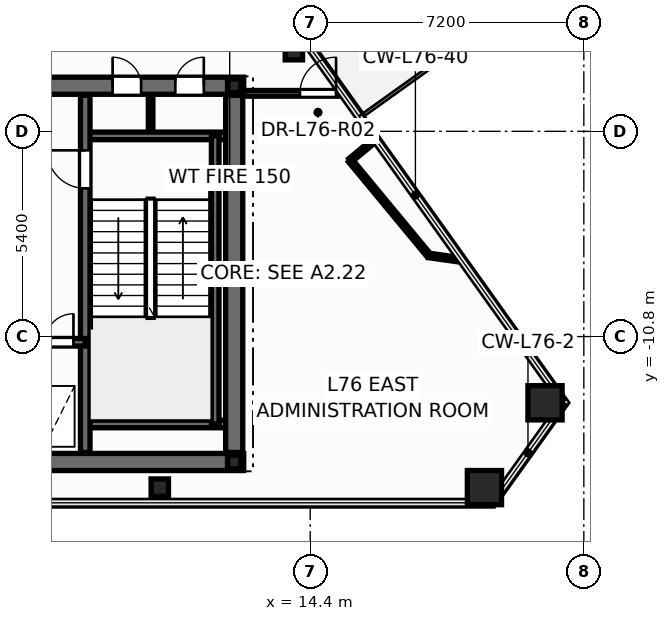
"""IFC4 building model, lengths in metres.
Left out: names, types, materials, properties, quantities, classifications, styles, units other than length and angle.
Written with IfcOpenShell. Run it as: python <this file> out.ifc"""

import sys

from ifc_helpers import new_model, si_unit, direction, frame, frame_2d, origin, origin_2d, place, context, subcontext, project, spatial, rectangle, hollow_rectangle, hollow_circle, i_section, extrude, element, fill, save


model = new_model("IFC4")
c1 = context("Model", 3, precision=1e-05, world=origin(), true_north=direction((0.0, 1.0)))
c2 = subcontext(c1, "Body", "Model", "MODEL_VIEW")
j1 = project(units=[si_unit("LENGTHUNIT", "METRE"), si_unit("PLANEANGLEUNIT", "RADIAN")], contexts=[c1])
p1 = place(None, origin())
s1 = spatial("IfcSite", under=j1, at=p1, CompositionType="ELEMENT")
p2 = place(p1, origin())
s2 = spatial("IfcBuilding", under=s1, at=p2, CompositionType="ELEMENT")
p3 = place(p2, frame((0.0, 0.0, 289.2)))
s3 = spatial("IfcBuildingStorey", under=s2, at=p3, CompositionType="ELEMENT", Elevation=289.2)
for number, where, z_axis, x_axis in (
    (1, (18.985, -14.774, 0.0), (0.0, 0.0, 1.0), (1.0, 0.0, 0.0)),
    (2, (20.579, -12.543, 0.0), (0.0, 0.0, 1.0), (1.0, 0.0, 0.0)),
):
    element("IfcColumn", number, at=place(p3, frame(where, z_axis=z_axis, x_axis=x_axis)), inside=s3, PredefinedType="COLUMN", context=c2, shape_type="SweptSolid", body=[
        extrude(hollow_rectangle(XDim=0.9, YDim=0.9, WallThickness=0.04, at=origin_2d()), origin(), (0.0, 0.0, 1.0), 4.2),
    ])
for number, where, z_axis, x_axis in (
    (3, (10.442, -14.774, 0.0), (0.0, 0.0, 1.0), (1.0, 0.0, 0.0)),
    (4, (13.97, -3.292, 0.0), (0.0, 0.0, 1.0), (1.0, 0.0, 0.0)),
):
    element("IfcColumn", number, at=place(p3, frame(where, z_axis=z_axis, x_axis=x_axis)), inside=s3, PredefinedType="COLUMN", context=c2, shape_type="SweptSolid", body=[
        extrude(hollow_circle(Radius=0.229, WallThickness=0.016, at=origin_2d()), origin(), (0.0, 0.0, 1.0), 4.2),
    ])
for number, where, z_axis, x_axis in (
    (5, (12.4, -14.1, 0.0), (0.0, 0.0, 1.0), (1.0, 0.0, 0.0)),
    (6, (12.4, -4.2, 0.0), (0.0, 0.0, 1.0), (1.0, 0.0, 0.0)),
):
    element("IfcColumn", number, at=place(p3, frame(where, z_axis=z_axis, x_axis=x_axis)), inside=s3, PredefinedType="COLUMN", context=c2, shape_type="SweptSolid", body=[
        extrude(i_section(OverallWidth=0.352, OverallDepth=0.359, WebThickness=0.018, FlangeThickness=0.026, at=origin_2d()), origin(), (0.0, 0.0, 1.0), 4.2),
    ])
p4 = place(p3, frame((10.2, -5.52, 0.0), z_axis=(0.0, 0.0, 1.0), x_axis=(0.0, 1.0, 0.0)))
e7 = element("IfcWall", 7, at=p4, inside=s3, PredefinedType="PARTITIONING", context=c2, shape_type="SweptSolid", body=[
    extrude(rectangle(XDim=1.12, YDim=0.12, at=frame_2d((0.56, 0.0))), origin(), (0.0, 0.0, 1.0), 3.92),
])
p5 = place(p3, frame((-12.65, -14.1, 0.0), z_axis=(0.0, 0.0, 1.0), x_axis=(1.0, 0.0, 0.0)))
e8 = element("IfcWall", 8, at=p5, inside=s3, PredefinedType="SHEAR", context=c2, shape_type="SweptSolid", body=[
    extrude(rectangle(XDim=25.3, YDim=0.45, at=frame_2d((12.65, 0.0))), origin(), (0.0, 0.0, 1.0), 4.2),
])
p6 = place(p3, frame((-12.65, -4.2, 0.0), z_axis=(0.0, 0.0, 1.0), x_axis=(1.0, 0.0, 0.0)))
e9 = element("IfcWall", 9, at=p6, inside=s3, PredefinedType="SHEAR", context=c2, shape_type="SweptSolid", body=[
    extrude(rectangle(XDim=25.3, YDim=0.45, at=frame_2d((12.65, 0.0))), origin(), (0.0, 0.0, 1.0), 4.2),
])
p7 = place(p6, frame((1.85, 0.0, 0.0)))
e10 = element("IfcOpeningElement", 10, at=p7, cuts=e9, PredefinedType="OPENING", context=c2, shape_type="SweptSolid", body=[
    extrude(rectangle(XDim=0.756, YDim=2.054, at=frame_2d((0.375, 1.027))), frame((0.0, 0.235, 0.0), z_axis=(0.0, -1.0, 0.0), x_axis=(1.0, 0.0, 0.0)), (0.0, 0.0, 1.0), 0.47),
])
p8 = place(p6, frame((21.85, 0.0, 0.0)))
e11 = element("IfcOpeningElement", 11, at=p8, cuts=e9, PredefinedType="OPENING", context=c2, shape_type="SweptSolid", body=[
    extrude(rectangle(XDim=0.756, YDim=2.054, at=frame_2d((0.375, 1.027))), frame((0.0, 0.235, 0.0), z_axis=(0.0, -1.0, 0.0), x_axis=(1.0, 0.0, 0.0)), (0.0, 0.0, 1.0), 0.47),
])
p9 = place(p6, frame((23.5, 0.0, 0.0)))
e12 = element("IfcOpeningElement", 12, at=p9, cuts=e9, PredefinedType="OPENING", context=c2, shape_type="SweptSolid", body=[
    extrude(rectangle(XDim=0.756, YDim=2.054, at=frame_2d((0.375, 1.027))), frame((0.0, 0.235, 0.0), z_axis=(0.0, -1.0, 0.0), x_axis=(1.0, 0.0, 0.0)), (0.0, 0.0, 1.0), 0.47),
])
p10 = place(p6, frame((5.85, 0.0, 0.0)))
e13 = element("IfcOpeningElement", 13, at=p10, cuts=e9, PredefinedType="OPENING", context=c2, shape_type="SweptSolid", body=[
    extrude(rectangle(XDim=1.006, YDim=2.104, at=frame_2d((0.5, 1.052))), frame((0.0, 0.235, 0.0), z_axis=(0.0, -1.0, 0.0), x_axis=(1.0, 0.0, 0.0)), (0.0, 0.0, 1.0), 0.47),
])
p11 = place(p6, frame((10.35, 0.0, 0.0)))
e14 = element("IfcOpeningElement", 14, at=p11, cuts=e9, PredefinedType="OPENING", context=c2, shape_type="SweptSolid", body=[
    extrude(rectangle(XDim=1.406, YDim=2.154, at=frame_2d((0.7, 1.077))), frame((0.0, 0.235, 0.0), z_axis=(0.0, -1.0, 0.0), x_axis=(1.0, 0.0, 0.0)), (0.0, 0.0, 1.0), 0.47),
])
p12 = place(p6, frame((18.45, 0.0, 0.0)))
e15 = element("IfcOpeningElement", 15, at=p12, cuts=e9, PredefinedType="OPENING", context=c2, shape_type="SweptSolid", body=[
    extrude(rectangle(XDim=1.006, YDim=2.104, at=frame_2d((0.5, 1.052))), frame((0.0, 0.235, 0.0), z_axis=(0.0, -1.0, 0.0), x_axis=(1.0, 0.0, 0.0)), (0.0, 0.0, 1.0), 0.47),
])
for number, where, z_axis, x_axis in (
    (16, (8.48, -5.52, 0.0), (0.0, 0.0, 1.0), (1.0, 0.0, 0.0)),
    (17, (8.48, -13.1, 0.0), (0.0, 0.0, 1.0), (1.0, 0.0, 0.0)),
):
    element("IfcWall", number, at=place(p3, frame(where, z_axis=z_axis, x_axis=x_axis)), inside=s3, PredefinedType="SOLIDWALL", context=c2, shape_type="SweptSolid", body=[
        extrude(rectangle(XDim=3.87, YDim=0.2, at=frame_2d((1.935, 0.0))), origin(), (0.0, 0.0, 1.0), 4.2),
    ])
p13 = place(p3, frame((11.9, -13.1, 0.0), z_axis=(0.0, 0.0, 1.0), x_axis=(0.0, 1.0, 0.0)))
e18 = element("IfcWall", 18, at=p13, inside=s3, PredefinedType="SOLIDWALL", context=c2, shape_type="SweptSolid", body=[
    extrude(rectangle(XDim=7.58, YDim=0.2, at=frame_2d((3.79, 0.0))), origin(), (0.0, 0.0, 1.0), 4.2),
])
p14 = place(p3, frame((8.48, -13.85, 0.0), z_axis=(0.0, 0.0, 1.0), x_axis=(0.0, 1.0, 0.0)))
e19 = element("IfcWall", 19, at=p14, inside=s3, PredefinedType="SHEAR", context=c2, shape_type="SweptSolid", body=[
    extrude(rectangle(XDim=9.4, YDim=0.25, at=frame_2d((4.7, 0.0))), origin(), (0.0, 0.0, 1.0), 4.2),
])
p15 = place(p14, frame((6.95, 0.0, 0.0)))
e20 = element("IfcOpeningElement", 20, at=p15, cuts=e19, PredefinedType="OPENING", context=c2, shape_type="SweptSolid", body=[
    extrude(rectangle(XDim=1.006, YDim=2.104, at=frame_2d((0.5, 1.052))), frame((0.0, 0.135, 0.0), z_axis=(0.0, -1.0, 0.0), x_axis=(1.0, 0.0, 0.0)), (0.0, 0.0, 1.0), 0.27),
])
p16 = place(p3, frame((5.12, -10.95, 0.0), z_axis=(0.0, 0.0, 1.0), x_axis=(1.0, 0.0, 0.0)))
e21 = element("IfcWall", 21, at=p16, inside=s3, PredefinedType="SOLIDWALL", context=c2, shape_type="SweptSolid", body=[
    extrude(rectangle(XDim=3.36, YDim=0.2, at=frame_2d((1.68, 0.0))), origin(), (0.0, 0.0, 1.0), 4.2),
])
p17 = place(p16, frame((0.42, 0.0, 0.0)))
e22 = element("IfcOpeningElement", 22, at=p17, cuts=e21, PredefinedType="OPENING", context=c2, shape_type="SweptSolid", body=[
    extrude(rectangle(XDim=1.106, YDim=2.104, at=frame_2d((0.55, 1.052))), frame((0.0, 0.11, 0.0), z_axis=(0.0, -1.0, 0.0), x_axis=(1.0, 0.0, 0.0)), (0.0, 0.0, 1.0), 0.22),
])
p18 = place(p16, frame((2.3, 0.0, 0.0)))
e23 = element("IfcOpeningElement", 23, at=p18, cuts=e21, PredefinedType="OPENING", context=c2, shape_type="SweptSolid", body=[
    extrude(rectangle(XDim=0.756, YDim=2.054, at=frame_2d((0.375, 1.027))), frame((0.0, 0.11, 0.0), z_axis=(0.0, -1.0, 0.0), x_axis=(1.0, 0.0, 0.0)), (0.0, 0.0, 1.0), 0.22),
])
p19 = place(p3, frame((12.4, -13.85, 0.0), z_axis=(0.0, 0.0, 1.0), x_axis=(0.0, 1.0, 0.0)))
e24 = element("IfcWall", 24, at=p19, inside=s3, PredefinedType="SHEAR", context=c2, shape_type="SweptSolid", body=[
    extrude(rectangle(XDim=9.4, YDim=0.45, at=frame_2d((4.7, 0.0))), origin(), (0.0, 0.0, 1.0), 4.2),
])
p20 = place(p3, frame((17.523, -8.666, 0.0), z_axis=(0.0, 0.0, 1.0), x_axis=(-0.63764463782, 0.770330653589, 0.0)))
e25 = element("IfcWall", 25, at=p20, inside=s3, PredefinedType="PARTITIONING", context=c2, shape_type="SweptSolid", body=[
    extrude(rectangle(XDim=3.248, YDim=0.12, at=frame_2d((1.624, 0.0))), origin(), (0.0, 0.0, 1.0), 3.92),
])
p21 = place(p3, frame((12.652, -4.4, 0.0), z_axis=(0.0, 0.0, 1.0), x_axis=(1.0, 0.0, 0.0)))
e26 = element("IfcWall", 26, at=p21, inside=s3, PredefinedType="PARTITIONING", context=c2, shape_type="SweptSolid", body=[
    extrude(rectangle(XDim=2.602, YDim=0.15, at=frame_2d((1.301, 0.0))), origin(), (0.0, 0.0, 1.0), 2.895),
])
p22 = place(p21, frame((1.478, 0.0, 0.0)))
e27 = element("IfcOpeningElement", 27, at=p22, cuts=e26, PredefinedType="OPENING", context=c2, shape_type="SweptSolid", body=[
    extrude(rectangle(XDim=0.956, YDim=2.104, at=frame_2d((0.475, 1.052))), frame((0.0, 0.085, 0.0), z_axis=(0.0, -1.0, 0.0), x_axis=(1.0, 0.0, 0.0)), (0.0, 0.0, 1.0), 0.17),
])
p23 = place(p3, frame((18.375, -8.786, 0.0), z_axis=(0.0, 0.0, 1.0), x_axis=(-0.990225952564, 0.139472444839, 0.0)))
e28 = element("IfcWall", 28, at=p23, inside=s3, PredefinedType="PARTITIONING", context=c2, shape_type="SweptSolid", body=[
    extrude(rectangle(XDim=0.859, YDim=0.12, at=frame_2d((0.43, 0.0))), origin(), (0.0, 0.0, 1.0), 3.438),
])
p24 = place(p3, frame((15.453, -6.164, 0.0), z_axis=(0.0, 0.0, 1.0), x_axis=(0.770181697766, 0.637824546742, 0.0)))
e29 = element("IfcWall", 29, at=p24, inside=s3, PredefinedType="PARTITIONING", context=c2, shape_type="SweptSolid", body=[
    extrude(rectangle(XDim=0.856, YDim=0.12, at=frame_2d((0.428, 0.0))), origin(), (0.0, 0.0, 1.0), 3.438),
])
p25 = place(p15, origin())
e30 = element("IfcDoor", 30, at=p25, inside=s3, OperationType="SINGLE_SWING_RIGHT", PredefinedType="DOOR", context=c2, shape_type="SweptSolid", body=[
    extrude(rectangle(XDim=1.0, YDim=2.1, at=frame_2d((0.5, 1.05))), frame((0.0, 0.025, 0.0), z_axis=(0.0, -1.0, 0.0), x_axis=(1.0, 0.0, 0.0)), (0.0, 0.0, 1.0), 0.05),
])
fill(e20, e30)
p26 = place(p18, origin())
e31 = element("IfcDoor", 31, at=p26, inside=s3, OperationType="SINGLE_SWING_RIGHT", PredefinedType="DOOR", context=c2, shape_type="SweptSolid", body=[
    extrude(rectangle(XDim=0.75, YDim=2.05, at=frame_2d((0.375, 1.025))), frame((0.0, 0.025, 0.0), z_axis=(0.0, -1.0, 0.0), x_axis=(1.0, 0.0, 0.0)), (0.0, 0.0, 1.0), 0.05),
])
fill(e23, e31)
p27 = place(p8, origin())
e32 = element("IfcDoor", 32, at=p27, inside=s3, OperationType="SINGLE_SWING_LEFT", PredefinedType="DOOR", context=c2, shape_type="SweptSolid", body=[
    extrude(rectangle(XDim=0.75, YDim=2.05, at=frame_2d((0.375, 1.025))), frame((0.0, 0.025, 0.0), z_axis=(0.0, -1.0, 0.0), x_axis=(1.0, 0.0, 0.0)), (0.0, 0.0, 1.0), 0.05),
])
fill(e11, e32)
p28 = place(p9, origin())
e33 = element("IfcDoor", 33, at=p28, inside=s3, OperationType="SINGLE_SWING_RIGHT", PredefinedType="DOOR", context=c2, shape_type="SweptSolid", body=[
    extrude(rectangle(XDim=0.75, YDim=2.05, at=frame_2d((0.375, 1.025))), frame((0.0, 0.025, 0.0), z_axis=(0.0, -1.0, 0.0), x_axis=(1.0, 0.0, 0.0)), (0.0, 0.0, 1.0), 0.05),
])
fill(e12, e33)
p29 = place(p22, origin())
e34 = element("IfcDoor", 34, at=p29, inside=s3, OperationType="SINGLE_SWING_RIGHT", PredefinedType="DOOR", context=c2, shape_type="SweptSolid", body=[
    extrude(rectangle(XDim=0.95, YDim=2.1, at=frame_2d((0.475, 1.05))), frame((0.0, 0.025, 0.0), z_axis=(0.0, -1.0, 0.0), x_axis=(1.0, 0.0, 0.0)), (0.0, 0.0, 1.0), 0.05),
])
fill(e27, e34)
save(model, sys.argv[1])
